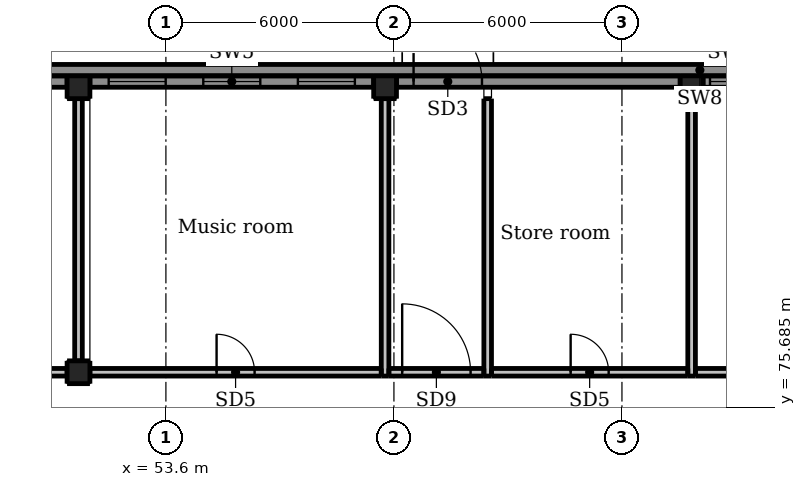
"""IFC4 building model, lengths in metres.
Left out: names, types, materials, properties, quantities, classifications, styles, units other than length and angle.
Written with IfcOpenShell. Run it as: python <this file> out.ifc"""

import sys

from ifc_helpers import new_model, si_unit, direction, frame, frame_2d, origin, origin_2d, place, context, subcontext, project, spatial, rectangle, extrude, element, fill, save


model = new_model("IFC4")
c1 = context("Model", 3, precision=1e-05, world=origin(), true_north=direction((0.0, 1.0)))
c2 = subcontext(c1, "Body", "Model", "MODEL_VIEW")
j1 = project(units=[si_unit("LENGTHUNIT", "METRE"), si_unit("PLANEANGLEUNIT", "RADIAN")], contexts=[c1])
p1 = place(None, origin())
s1 = spatial("IfcSite", under=j1, at=p1, CompositionType="ELEMENT")
p2 = place(p1, origin())
s2 = spatial("IfcBuilding", under=s1, at=p2, CompositionType="ELEMENT")
p3 = place(p2, origin())
s3 = spatial("IfcBuildingStorey", under=s2, at=p3, CompositionType="ELEMENT", Elevation=0.0)
for number, where, z_axis, x_axis in (
    (1, (51.3, 76.6, -0.3), (0.0, 0.0, 1.0), (1.0, 0.0, 0.0)),
    (2, (51.3, 84.1, -0.3), (0.0, 0.0, 1.0), (1.0, 0.0, 0.0)),
    (3, (59.367, 84.1, -0.3), (0.0, 0.0, 1.0), (1.0, 0.0, 0.0)),
    (4, (67.433, 84.1, -0.3), (0.0, 0.0, 1.0), (1.0, 0.0, 0.0)),
):
    element("IfcColumn", number, at=place(p3, frame(where, z_axis=z_axis, x_axis=x_axis)), inside=s3, PredefinedType="COLUMN", context=c2, shape_type="SweptSolid", body=[
        extrude(rectangle(XDim=0.6, YDim=0.6, at=origin_2d()), origin(), (0.0, 0.0, 1.0), 5.5),
    ])
p4 = place(p3, frame((43.9, 84.25, 0.0), z_axis=(0.0, 0.0, 1.0), x_axis=(1.0, 0.0, 0.0)))
e5 = element("IfcWall", 5, at=p4, inside=s3, PredefinedType="SOLIDWALL", context=c2, shape_type="SweptSolid", body=[
    extrude(rectangle(XDim=7.1, YDim=0.3, at=frame_2d((3.55, 0.0))), origin(), (0.0, 0.0, 1.0), 4.3),
])
p5 = place(p4, frame((2.65, 0.0, 0.0)))
e6 = element("IfcOpeningElement", 6, at=p5, cuts=e5, PredefinedType="OPENING", context=c2, shape_type="SweptSolid", body=[
    extrude(rectangle(XDim=1.8, YDim=2.1, at=frame_2d((0.9, 1.05))), frame((0.0, 0.16, 0.0), z_axis=(0.0, -1.0, 0.0), x_axis=(1.0, 0.0, 0.0)), (0.0, 0.0, 1.0), 0.32),
])
p6 = place(p4, frame((0.433, 0.0, 0.9)))
e7 = element("IfcOpeningElement", 7, at=p6, cuts=e5, PredefinedType="OPENING", context=c2, shape_type="SweptSolid", body=[
    extrude(rectangle(XDim=1.5, YDim=1.5, at=frame_2d((0.75, 0.75))), frame((0.0, 0.16, 0.0), z_axis=(0.0, -1.0, 0.0), x_axis=(1.0, 0.0, 0.0)), (0.0, 0.0, 1.0), 0.32),
])
p7 = place(p4, frame((5.167, 0.0, 0.9)))
e8 = element("IfcOpeningElement", 8, at=p7, cuts=e5, PredefinedType="OPENING", context=c2, shape_type="SweptSolid", body=[
    extrude(rectangle(XDim=1.5, YDim=1.5, at=frame_2d((0.75, 0.75))), frame((0.0, 0.16, 0.0), z_axis=(0.0, -1.0, 0.0), x_axis=(1.0, 0.0, 0.0)), (0.0, 0.0, 1.0), 0.32),
])
p8 = place(p3, frame((51.6, 84.25, 0.0), z_axis=(0.0, 0.0, 1.0), x_axis=(1.0, 0.0, 0.0)))
e9 = element("IfcWall", 9, at=p8, inside=s3, PredefinedType="SOLIDWALL", context=c2, shape_type="SweptSolid", body=[
    extrude(rectangle(XDim=7.467, YDim=0.3, at=frame_2d((3.733, 0.0))), origin(), (0.0, 0.0, 1.0), 4.3),
])
p9 = place(p8, frame((0.494, 0.0, 0.9)))
e10 = element("IfcOpeningElement", 10, at=p9, cuts=e9, PredefinedType="OPENING", context=c2, shape_type="SweptSolid", body=[
    extrude(rectangle(XDim=1.5, YDim=1.5, at=frame_2d((0.75, 0.75))), frame((0.0, 0.16, 0.0), z_axis=(0.0, -1.0, 0.0), x_axis=(1.0, 0.0, 0.0)), (0.0, 0.0, 1.0), 0.32),
])
p10 = place(p8, frame((2.983, 0.0, 0.9)))
e11 = element("IfcOpeningElement", 11, at=p10, cuts=e9, PredefinedType="OPENING", context=c2, shape_type="SweptSolid", body=[
    extrude(rectangle(XDim=1.5, YDim=1.5, at=frame_2d((0.75, 0.75))), frame((0.0, 0.16, 0.0), z_axis=(0.0, -1.0, 0.0), x_axis=(1.0, 0.0, 0.0)), (0.0, 0.0, 1.0), 0.32),
])
p11 = place(p8, frame((5.472, 0.0, 0.9)))
e12 = element("IfcOpeningElement", 12, at=p11, cuts=e9, PredefinedType="OPENING", context=c2, shape_type="SweptSolid", body=[
    extrude(rectangle(XDim=1.5, YDim=1.5, at=frame_2d((0.75, 0.75))), frame((0.0, 0.16, 0.0), z_axis=(0.0, -1.0, 0.0), x_axis=(1.0, 0.0, 0.0)), (0.0, 0.0, 1.0), 0.32),
])
p12 = place(p3, frame((59.667, 84.25, 0.0), z_axis=(0.0, 0.0, 1.0), x_axis=(1.0, 0.0, 0.0)))
e13 = element("IfcWall", 13, at=p12, inside=s3, PredefinedType="SOLIDWALL", context=c2, shape_type="SweptSolid", body=[
    extrude(rectangle(XDim=7.466, YDim=0.3, at=frame_2d((3.733, 0.0))), origin(), (0.0, 0.0, 1.0), 4.3),
])
p13 = place(p12, frame((0.45, 0.0, 0.0)))
e14 = element("IfcOpeningElement", 14, at=p13, cuts=e13, PredefinedType="OPENING", context=c2, shape_type="SweptSolid", body=[
    extrude(rectangle(XDim=1.8, YDim=2.1, at=frame_2d((0.9, 1.05))), frame((0.0, 0.16, 0.0), z_axis=(0.0, -1.0, 0.0), x_axis=(1.0, 0.0, 0.0)), (0.0, 0.0, 1.0), 0.32),
])
p14 = place(p3, frame((67.733, 84.25, 0.0), z_axis=(0.0, 0.0, 1.0), x_axis=(1.0, 0.0, 0.0)))
e15 = element("IfcWall", 15, at=p14, inside=s3, PredefinedType="SOLIDWALL", context=c2, shape_type="SweptSolid", body=[
    extrude(rectangle(XDim=7.467, YDim=0.3, at=frame_2d((3.733, 0.0))), origin(), (0.0, 0.0, 1.0), 4.3),
])
p15 = place(p14, frame((2.833, 0.0, 0.0)))
e16 = element("IfcOpeningElement", 16, at=p15, cuts=e15, PredefinedType="OPENING", context=c2, shape_type="SweptSolid", body=[
    extrude(rectangle(XDim=1.8, YDim=2.1, at=frame_2d((0.9, 1.05))), frame((0.0, 0.16, 0.0), z_axis=(0.0, -1.0, 0.0), x_axis=(1.0, 0.0, 0.0)), (0.0, 0.0, 1.0), 0.32),
])
p16 = place(p14, frame((0.184, 0.0, 2.6)))
e17 = element("IfcOpeningElement", 17, at=p16, cuts=e15, PredefinedType="OPENING", context=c2, shape_type="SweptSolid", body=[
    extrude(rectangle(XDim=1.5, YDim=1.2, at=frame_2d((0.75, 0.6))), frame((0.0, 0.16, 0.0), z_axis=(0.0, -1.0, 0.0), x_axis=(1.0, 0.0, 0.0)), (0.0, 0.0, 1.0), 0.32),
])
p17 = place(p14, frame((5.783, 0.0, 2.6)))
e18 = element("IfcOpeningElement", 18, at=p17, cuts=e15, PredefinedType="OPENING", context=c2, shape_type="SweptSolid", body=[
    extrude(rectangle(XDim=1.5, YDim=1.2, at=frame_2d((0.75, 0.6))), frame((0.0, 0.16, 0.0), z_axis=(0.0, -1.0, 0.0), x_axis=(1.0, 0.0, 0.0)), (0.0, 0.0, 1.0), 0.32),
])
p18 = place(p3, frame((35.3, 84.55, -0.3), z_axis=(0.0, 0.0, 1.0), x_axis=(1.0, 0.0, 0.0)))
e19 = element("IfcWall", 19, at=p18, inside=s3, PredefinedType="SOLIDWALL", context=c2, shape_type="SweptSolid", body=[
    extrude(rectangle(XDim=64.7, YDim=0.3, at=frame_2d((32.35, 0.0))), origin(), (0.0, 0.0, 1.0), 0.3),
])
p19 = place(p3, frame((36.2, 76.6, 0.0), z_axis=(0.0, 0.0, 1.0), x_axis=(1.0, 0.0, 0.0)))
e20 = element("IfcWall", 20, at=p19, inside=s3, PredefinedType="PARTITIONING", context=c2, shape_type="SweptSolid", body=[
    extrude(rectangle(XDim=14.8, YDim=0.2, at=frame_2d((7.4, 0.0))), origin(), (0.0, 0.0, 1.0), 4.1),
])
p20 = place(p19, frame((11.1, 0.0, 0.0)))
e21 = element("IfcOpeningElement", 21, at=p20, cuts=e20, PredefinedType="OPENING", context=c2, shape_type="SweptSolid", body=[
    extrude(rectangle(XDim=1.0, YDim=2.1, at=frame_2d((0.5, 1.05))), frame((0.0, 0.11, 0.0), z_axis=(0.0, -1.0, 0.0), x_axis=(1.0, 0.0, 0.0)), (0.0, 0.0, 1.0), 0.22),
])
p21 = place(p3, frame((51.3, 76.9, 0.0), z_axis=(0.0, 0.0, 1.0), x_axis=(0.0, 1.0, 0.0)))
e22 = element("IfcWall", 22, at=p21, inside=s3, PredefinedType="PARTITIONING", context=c2, shape_type="SweptSolid", body=[
    extrude(rectangle(XDim=6.9, YDim=0.2, at=frame_2d((3.45, 0.0))), origin(), (0.0, 0.0, 1.0), 4.1),
])
p22 = place(p3, frame((51.6, 76.6, 0.0), z_axis=(0.0, 0.0, 1.0), x_axis=(1.0, 0.0, 0.0)))
e23 = element("IfcWall", 23, at=p22, inside=s3, PredefinedType="PARTITIONING", context=c2, shape_type="SweptSolid", body=[
    extrude(rectangle(XDim=7.667, YDim=0.2, at=frame_2d((3.833, 0.0))), origin(), (0.0, 0.0, 1.0), 4.1),
])
p23 = place(p22, frame((3.333, 0.0, 0.0)))
e24 = element("IfcOpeningElement", 24, at=p23, cuts=e23, PredefinedType="OPENING", context=c2, shape_type="SweptSolid", body=[
    extrude(rectangle(XDim=1.0, YDim=2.1, at=frame_2d((0.5, 1.05))), frame((0.0, 0.11, 0.0), z_axis=(0.0, -1.0, 0.0), x_axis=(1.0, 0.0, 0.0)), (0.0, 0.0, 1.0), 0.22),
])
p24 = place(p3, frame((62.167, 76.6, 0.0), z_axis=(0.0, 0.0, 1.0), x_axis=(1.0, 0.0, 0.0)))
e25 = element("IfcWall", 25, at=p24, inside=s3, PredefinedType="PARTITIONING", context=c2, shape_type="SweptSolid", body=[
    extrude(rectangle(XDim=5.166, YDim=0.2, at=frame_2d((2.583, 0.0))), origin(), (0.0, 0.0, 1.0), 4.1),
])
p25 = place(p24, frame((2.083, 0.0, 0.0)))
e26 = element("IfcOpeningElement", 26, at=p25, cuts=e25, PredefinedType="OPENING", context=c2, shape_type="SweptSolid", body=[
    extrude(rectangle(XDim=1.0, YDim=2.1, at=frame_2d((0.5, 1.05))), frame((0.0, 0.11, 0.0), z_axis=(0.0, -1.0, 0.0), x_axis=(1.0, 0.0, 0.0)), (0.0, 0.0, 1.0), 0.22),
])
p26 = place(p3, frame((67.533, 76.6, 0.0), z_axis=(0.0, 0.0, 1.0), x_axis=(1.0, 0.0, 0.0)))
e27 = element("IfcWall", 27, at=p26, inside=s3, PredefinedType="PARTITIONING", context=c2, shape_type="SweptSolid", body=[
    extrude(rectangle(XDim=24.0, YDim=0.2, at=frame_2d((12.0, 0.0))), origin(), (0.0, 0.0, 1.0), 4.1),
])
p27 = place(p26, frame((3.9, 0.0, 0.0)))
e28 = element("IfcOpeningElement", 28, at=p27, cuts=e27, PredefinedType="OPENING", context=c2, shape_type="SweptSolid", body=[
    extrude(rectangle(XDim=1.8, YDim=2.1, at=frame_2d((0.9, 1.05))), frame((0.0, 0.11, 0.0), z_axis=(0.0, -1.0, 0.0), x_axis=(1.0, 0.0, 0.0)), (0.0, 0.0, 1.0), 0.22),
])
p28 = place(p26, frame((18.3, 0.0, 0.0)))
e29 = element("IfcOpeningElement", 29, at=p28, cuts=e27, PredefinedType="OPENING", context=c2, shape_type="SweptSolid", body=[
    extrude(rectangle(XDim=1.8, YDim=2.1, at=frame_2d((0.9, 1.05))), frame((0.0, 0.11, 0.0), z_axis=(0.0, -1.0, 0.0), x_axis=(1.0, 0.0, 0.0)), (0.0, 0.0, 1.0), 0.22),
])
for number, where, z_axis, x_axis in (
    (30, (59.367, 76.5, 0.0), (0.0, 0.0, 1.0), (0.0, 1.0, 0.0)),
    (31, (62.067, 76.5, 0.0), (0.0, 0.0, 1.0), (0.0, 1.0, 0.0)),
    (32, (67.433, 76.5, 0.0), (0.0, 0.0, 1.0), (0.0, 1.0, 0.0)),
):
    element("IfcWall", number, at=place(p3, frame(where, z_axis=z_axis, x_axis=x_axis)), inside=s3, PredefinedType="PARTITIONING", context=c2, shape_type="SweptSolid", body=[
        extrude(rectangle(XDim=7.3, YDim=0.2, at=frame_2d((3.65, 0.0))), origin(), (0.0, 0.0, 1.0), 4.1),
    ])
p29 = place(p3, frame((59.467, 76.6, 0.0), z_axis=(0.0, 0.0, 1.0), x_axis=(1.0, 0.0, 0.0)))
e33 = element("IfcWall", 33, at=p29, inside=s3, PredefinedType="PARTITIONING", context=c2, shape_type="SweptSolid", body=[
    extrude(rectangle(XDim=2.5, YDim=0.2, at=frame_2d((1.25, 0.0))), origin(), (0.0, 0.0, 1.0), 4.1),
])
p30 = place(p29, frame((0.35, 0.0, 0.0)))
e34 = element("IfcOpeningElement", 34, at=p30, cuts=e33, PredefinedType="OPENING", context=c2, shape_type="SweptSolid", body=[
    extrude(rectangle(XDim=1.8, YDim=2.1, at=frame_2d((0.9, 1.05))), frame((0.0, 0.11, 0.0), z_axis=(0.0, -1.0, 0.0), x_axis=(1.0, 0.0, 0.0)), (0.0, 0.0, 1.0), 0.22),
])
p31 = place(p9, origin())
e35 = element("IfcWindow", 35, at=p31, inside=s3, PartitioningType="DOUBLE_PANEL_HORIZONTAL", PredefinedType="WINDOW", context=c2, shape_type="SweptSolid", body=[
    extrude(rectangle(XDim=1.5, YDim=1.5, at=frame_2d((0.75, 0.75))), frame((0.0, 0.03, 0.0), z_axis=(0.0, -1.0, 0.0), x_axis=(1.0, 0.0, 0.0)), (0.0, 0.0, 1.0), 0.06),
])
fill(e10, e35)
p32 = place(p10, origin())
e36 = element("IfcWindow", 36, at=p32, inside=s3, PartitioningType="DOUBLE_PANEL_HORIZONTAL", PredefinedType="WINDOW", context=c2, shape_type="SweptSolid", body=[
    extrude(rectangle(XDim=1.5, YDim=1.5, at=frame_2d((0.75, 0.75))), frame((0.0, 0.03, 0.0), z_axis=(0.0, -1.0, 0.0), x_axis=(1.0, 0.0, 0.0)), (0.0, 0.0, 1.0), 0.06),
])
fill(e11, e36)
p33 = place(p11, origin())
e37 = element("IfcWindow", 37, at=p33, inside=s3, PartitioningType="DOUBLE_PANEL_HORIZONTAL", PredefinedType="WINDOW", context=c2, shape_type="SweptSolid", body=[
    extrude(rectangle(XDim=1.5, YDim=1.5, at=frame_2d((0.75, 0.75))), frame((0.0, 0.03, 0.0), z_axis=(0.0, -1.0, 0.0), x_axis=(1.0, 0.0, 0.0)), (0.0, 0.0, 1.0), 0.06),
])
fill(e12, e37)
p34 = place(p13, origin())
e38 = element("IfcDoor", 38, at=p34, inside=s3, OperationType="DOUBLE_DOOR_SINGLE_SWING", PredefinedType="DOOR", context=c2, shape_type="SweptSolid", body=[
    extrude(rectangle(XDim=1.8, YDim=2.1, at=frame_2d((0.9, 1.05))), frame((0.0, 0.025, 0.0), z_axis=(0.0, -1.0, 0.0), x_axis=(1.0, 0.0, 0.0)), (0.0, 0.0, 1.0), 0.05),
])
fill(e14, e38)
p35 = place(p16, origin())
e39 = element("IfcWindow", 39, at=p35, inside=s3, PartitioningType="SINGLE_PANEL", PredefinedType="WINDOW", context=c2, shape_type="SweptSolid", body=[
    extrude(rectangle(XDim=1.5, YDim=1.2, at=frame_2d((0.75, 0.6))), frame((0.0, 0.03, 0.0), z_axis=(0.0, -1.0, 0.0), x_axis=(1.0, 0.0, 0.0)), (0.0, 0.0, 1.0), 0.06),
])
fill(e17, e39)
p36 = place(p23, origin())
e40 = element("IfcDoor", 40, at=p36, inside=s3, OperationType="SINGLE_SWING_LEFT", PredefinedType="DOOR", context=c2, shape_type="SweptSolid", body=[
    extrude(rectangle(XDim=1.0, YDim=2.1, at=frame_2d((0.5, 1.05))), frame((0.0, 0.025, 0.0), z_axis=(0.0, -1.0, 0.0), x_axis=(1.0, 0.0, 0.0)), (0.0, 0.0, 1.0), 0.05),
])
fill(e24, e40)
p37 = place(p25, origin())
e41 = element("IfcDoor", 41, at=p37, inside=s3, OperationType="SINGLE_SWING_LEFT", PredefinedType="DOOR", context=c2, shape_type="SweptSolid", body=[
    extrude(rectangle(XDim=1.0, YDim=2.1, at=frame_2d((0.5, 1.05))), frame((0.0, 0.025, 0.0), z_axis=(0.0, -1.0, 0.0), x_axis=(1.0, 0.0, 0.0)), (0.0, 0.0, 1.0), 0.05),
])
fill(e26, e41)
p38 = place(p30, origin())
e42 = element("IfcDoor", 42, at=p38, inside=s3, OperationType="DOUBLE_DOOR_SINGLE_SWING", PredefinedType="DOOR", context=c2, shape_type="SweptSolid", body=[
    extrude(rectangle(XDim=1.8, YDim=2.1, at=frame_2d((0.9, 1.05))), frame((0.0, 0.025, 0.0), z_axis=(0.0, -1.0, 0.0), x_axis=(1.0, 0.0, 0.0)), (0.0, 0.0, 1.0), 0.05),
])
fill(e34, e42)
save(model, sys.argv[1])
